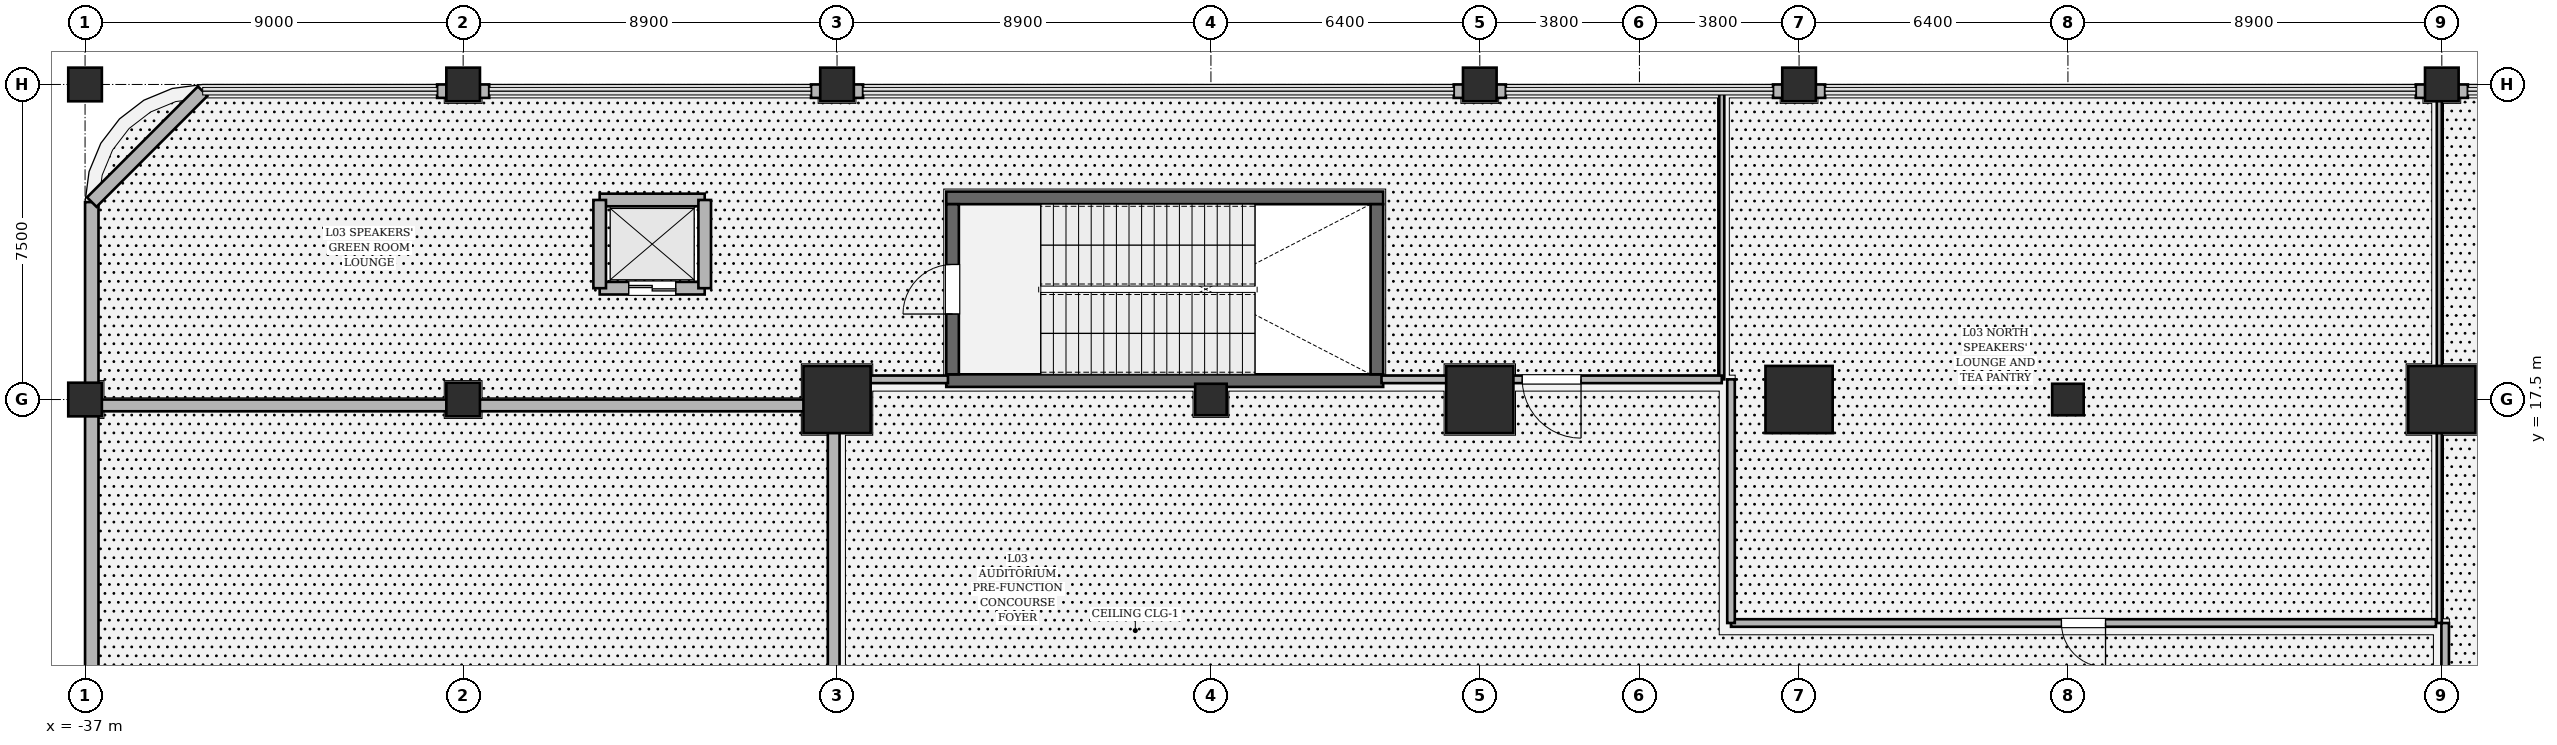
"""IFC4 building model, lengths in metres.
Left out: names, types, materials, properties, quantities, classifications, styles, units other than length and angle.
Written with IfcOpenShell. Run it as: python <this file> out.ifc"""

import sys

from ifc_helpers import new_model, si_unit, direction, frame, frame_2d, origin, origin_2d, place, context, subcontext, project, spatial, rectangle, hollow_rectangle, circle, extrude, element, fill, save


model = new_model("IFC4")
c1 = context("Model", 3, precision=1e-05, world=origin(), true_north=direction((0.0, 1.0)))
c2 = subcontext(c1, "Body", "Model", "MODEL_VIEW")
j1 = project(units=[si_unit("LENGTHUNIT", "METRE"), si_unit("PLANEANGLEUNIT", "RADIAN")], contexts=[c1])
p1 = place(None, origin())
s1 = spatial("IfcSite", under=j1, at=p1, CompositionType="ELEMENT")
p2 = place(p1, origin())
s2 = spatial("IfcBuilding", under=s1, at=p2, CompositionType="ELEMENT")
p3 = place(p2, frame((0.0, 0.0, 16.8)))
s3 = spatial("IfcBuildingStorey", under=s2, at=p3, CompositionType="ELEMENT", Elevation=16.8)
for number, where, z_axis, x_axis in (
    (1, (-16.5, 17.95, 0.0), (0.0, 0.0, 1.0), (1.0, 0.0, 0.0)),
    (2, (-6.1, 22.3, 0.0), (0.0, 0.0, 1.0), (-1.0, 0.0, 0.0)),
):
    element("IfcWall", number, at=place(p3, frame(where, z_axis=z_axis, x_axis=x_axis)), inside=s3, PredefinedType="SOLIDWALL", context=c2, shape_type="SweptSolid", body=[
        extrude(rectangle(XDim=10.4, YDim=0.3, at=frame_2d((5.2, 0.0))), origin(), (0.0, 0.0, 1.0), 5.4),
    ])
p4 = place(p3, frame((-16.35, 18.1, 0.0), z_axis=(0.0, 0.0, 1.0), x_axis=(0.0, 1.0, 0.0)))
e3 = element("IfcWall", 3, at=p4, inside=s3, PredefinedType="SOLIDWALL", context=c2, shape_type="SweptSolid", body=[
    extrude(rectangle(XDim=4.05, YDim=0.3, at=frame_2d((2.025, 0.0))), origin(), (0.0, 0.0, 1.0), 5.4),
])
p5 = place(p4, frame((1.435, 0.0, 0.0)))
e4 = element("IfcOpeningElement", 4, at=p5, cuts=e3, PredefinedType="OPENING", context=c2, shape_type="SweptSolid", body=[
    extrude(rectangle(XDim=1.18, YDim=2.2, at=frame_2d((0.59, 1.1))), frame((0.0, 0.16, 0.0), z_axis=(0.0, -1.0, 0.0), x_axis=(1.0, 0.0, 0.0)), (0.0, 0.0, 1.0), 0.32),
])
p6 = place(p3, frame((-6.25, 22.15, 0.0), z_axis=(0.0, 0.0, 1.0), x_axis=(0.0, -1.0, 0.0)))
e5 = element("IfcWall", 5, at=p6, inside=s3, PredefinedType="SOLIDWALL", context=c2, shape_type="SweptSolid", body=[
    extrude(rectangle(XDim=4.05, YDim=0.3, at=frame_2d((2.025, 0.0))), origin(), (0.0, 0.0, 1.0), 5.4),
])
for number, where, z_axis, x_axis in (
    (6, (19.1, 17.5, 0.0), (0.0, 0.0, 1.0), (1.0, 0.0, 0.0)),
    (7, (3.8, 17.5, 0.0), (0.0, 0.0, 1.0), (1.0, 0.0, 0.0)),
    (8, (-3.8, 17.5, 0.0), (0.0, 0.0, 1.0), (1.0, 0.0, 0.0)),
    (9, (-19.1, 17.5, 0.0), (0.0, 0.0, 1.0), (1.0, 0.0, 0.0)),
):
    element("IfcColumn", number, at=place(p3, frame(where, z_axis=z_axis, x_axis=x_axis)), inside=s3, PredefinedType="COLUMN", context=c2, shape_type="SweptSolid", body=[
        extrude(hollow_rectangle(XDim=1.6, YDim=1.6, WallThickness=0.05, at=origin_2d()), origin(), (0.0, 0.0, 1.0), 5.4),
    ])
for number, where, z_axis, x_axis in (
    (10, (-37.0, 17.5, 0.0), (0.0, 0.0, 1.0), (1.0, 0.0, 0.0)),
    (11, (-28.0, 17.5, 0.0), (0.0, 0.0, 1.0), (1.0, 0.0, 0.0)),
    (12, (-37.0, 25.0, 0.0), (0.0, 0.0, 1.0), (1.0, 0.0, 0.0)),
    (13, (-28.0, 25.0, 0.0), (0.0, 0.0, 1.0), (1.0, 0.0, 0.0)),
    (14, (-19.1, 25.0, 0.0), (0.0, 0.0, 1.0), (1.0, 0.0, 0.0)),
    (15, (-3.8, 25.0, 0.0), (0.0, 0.0, 1.0), (1.0, 0.0, 0.0)),
    (16, (3.8, 25.0, 0.0), (0.0, 0.0, 1.0), (1.0, 0.0, 0.0)),
    (17, (19.1, 25.0, 0.0), (0.0, 0.0, 1.0), (1.0, 0.0, 0.0)),
):
    element("IfcColumn", number, at=place(p3, frame(where, z_axis=z_axis, x_axis=x_axis)), inside=s3, PredefinedType="COLUMN", context=c2, shape_type="SweptSolid", body=[
        extrude(rectangle(XDim=0.8, YDim=0.8, at=origin_2d()), origin(), (0.0, 0.0, 1.0), 5.4),
    ])
for number, where, z_axis, x_axis in (
    (18, (-10.2, 17.5, 0.0), (0.0, 0.0, 1.0), (1.0, 0.0, 0.0)),
    (19, (10.2, 17.5, 0.0), (0.0, 0.0, 1.0), (1.0, 0.0, 0.0)),
):
    element("IfcColumn", number, at=place(p3, frame(where, z_axis=z_axis, x_axis=x_axis)), inside=s3, PredefinedType="PILASTER", context=c2, shape_type="SweptSolid", body=[
        extrude(circle(Radius=0.375, at=origin_2d()), origin(), (0.0, 0.0, 1.0), 5.4),
    ])
p7 = place(p3, frame((-27.38, 24.84, 0.0), z_axis=(0.0, 0.0, 1.0), x_axis=(-1.0, 0.0, 0.0)))
e20 = element("IfcWall", 20, at=p7, inside=s3, PredefinedType="SOLIDWALL", context=c2, shape_type="SweptSolid", body=[
    extrude(rectangle(XDim=1.24, YDim=0.32, at=frame_2d((0.62, 0.0))), origin(), (0.0, 0.0, 1.0), 4.314),
])
for number, where, z_axis, x_axis in (
    (21, (-18.48, 24.84, 0.0), (0.0, 0.0, 1.0), (-1.0, 0.0, 0.0)),
    (22, (-3.18, 24.84, 0.0), (0.0, 0.0, 1.0), (-1.0, 0.0, 0.0)),
    (23, (4.42, 24.84, 0.0), (0.0, 0.0, 1.0), (-1.0, 0.0, 0.0)),
    (24, (19.72, 24.84, 0.0), (0.0, 0.0, 1.0), (-1.0, 0.0, 0.0)),
):
    element("IfcWall", number, at=place(p3, frame(where, z_axis=z_axis, x_axis=x_axis)), inside=s3, PredefinedType="SOLIDWALL", context=c2, shape_type="SweptSolid", body=[
        extrude(rectangle(XDim=1.24, YDim=0.32, at=frame_2d((0.62, 0.0))), origin(), (0.0, 0.0, 1.0), 4.314),
    ])
p8 = place(p3, frame((-36.84, -22.2, 0.0), z_axis=(0.0, 0.0, 1.0), x_axis=(0.0, 1.0, 0.0)))
e25 = element("IfcWall", 25, at=p8, inside=s3, PredefinedType="SOLIDWALL", context=c2, shape_type="SweptSolid", body=[
    extrude(rectangle(XDim=44.4, YDim=0.32, at=frame_2d((22.2, 0.0))), origin(), (0.0, 0.0, 1.0), 3.164),
])
p9 = place(p3, frame((-36.84, 22.2, 0.0), z_axis=(0.0, 0.0, 1.0), x_axis=(0.707106781187, 0.707106781187, 0.0)))
e26 = element("IfcWall", 26, at=p9, inside=s3, PredefinedType="SOLIDWALL", context=c2, shape_type="SweptSolid", body=[
    extrude(rectangle(XDim=3.734, YDim=0.32, at=frame_2d((1.867, 0.0))), origin(), (0.0, 0.0, 1.0), 4.464),
])
p10 = place(p3, frame((-24.75, 20.15, 0.0), z_axis=(0.0, 0.0, 1.0), x_axis=(1.0, 0.0, 0.0)))
e27 = element("IfcWall", 27, at=p10, inside=s3, PredefinedType="SOLIDWALL", context=c2, shape_type="SweptSolid", body=[
    extrude(rectangle(XDim=2.5, YDim=0.3, at=frame_2d((1.25, 0.0))), origin(), (0.0, 0.0, 1.0), 5.02),
])
p11 = place(p10, frame((0.69, 0.0, 0.0)))
e28 = element("IfcOpeningElement", 28, at=p11, cuts=e27, PredefinedType="OPENING", context=c2, shape_type="SweptSolid", body=[
    extrude(rectangle(XDim=1.12, YDim=2.25, at=frame_2d((0.56, 1.125))), frame((0.0, 0.16, 0.0), z_axis=(0.0, -1.0, 0.0), x_axis=(1.0, 0.0, 0.0)), (0.0, 0.0, 1.0), 0.32),
])
p12 = place(p3, frame((-24.75, 22.25, 0.0), z_axis=(0.0, 0.0, 1.0), x_axis=(1.0, 0.0, 0.0)))
e29 = element("IfcWall", 29, at=p12, inside=s3, PredefinedType="SOLIDWALL", context=c2, shape_type="SweptSolid", body=[
    extrude(rectangle(XDim=2.5, YDim=0.3, at=frame_2d((1.25, 0.0))), origin(), (0.0, 0.0, 1.0), 5.02),
])
for number, where, z_axis, x_axis in (
    (30, (-24.75, 20.15, 0.0), (0.0, 0.0, 1.0), (0.0, 1.0, 0.0)),
    (31, (-22.25, 20.15, 0.0), (0.0, 0.0, 1.0), (0.0, 1.0, 0.0)),
):
    element("IfcWall", number, at=place(p3, frame(where, z_axis=z_axis, x_axis=x_axis)), inside=s3, PredefinedType="SOLIDWALL", context=c2, shape_type="SweptSolid", body=[
        extrude(rectangle(XDim=2.1, YDim=0.3, at=frame_2d((1.05, 0.0))), origin(), (0.0, 0.0, 1.0), 5.02),
    ])
p13 = place(p3, frame((-36.78, 17.36, 0.0), z_axis=(0.0, 0.0, 1.0), x_axis=(1.0, 0.0, 0.0)))
e32 = element("IfcWall", 32, at=p13, inside=s3, PredefinedType="SOLIDWALL", context=c2, shape_type="SweptSolid", body=[
    extrude(rectangle(XDim=17.6, YDim=0.28, at=frame_2d((8.8, 0.0))), origin(), (0.0, 0.0, 1.0), 3.164),
])
p14 = place(p3, frame((-19.18, 17.36, 0.0), z_axis=(0.0, 0.0, 1.0), x_axis=(0.0, -1.0, 0.0)))
e33 = element("IfcWall", 33, at=p14, inside=s3, PredefinedType="SOLIDWALL", context=c2, shape_type="SweptSolid", body=[
    extrude(rectangle(XDim=29.54, YDim=0.28, at=frame_2d((14.77, 0.0))), origin(), (0.0, 0.0, 1.0), 3.164),
])
p15 = place(p14, frame((15.22, 0.0, 0.0)))
e34 = element("IfcOpeningElement", 34, at=p15, cuts=e33, PredefinedType="OPENING", context=c2, shape_type="SweptSolid", body=[
    extrude(rectangle(XDim=1.8, YDim=2.35, at=frame_2d((0.9, 1.175))), frame((0.0, 0.15, 0.0), z_axis=(0.0, -1.0, 0.0), x_axis=(1.0, 0.0, 0.0)), (0.0, 0.0, 1.0), 0.3),
])
p16 = place(p3, frame((1.96, 24.78, 0.0), z_axis=(0.0, 0.0, 1.0), x_axis=(0.0, -1.0, 0.0)))
e35 = element("IfcWall", 35, at=p16, inside=s3, PredefinedType="PARTITIONING", context=c2, shape_type="SweptSolid", body=[
    extrude(rectangle(XDim=6.8, YDim=0.12, at=frame_2d((3.4, 0.0))), origin(), (0.0, 0.0, 1.0), 5.02),
])
p17 = place(p3, frame((1.96, 17.98, 0.0), z_axis=(0.0, 0.0, 1.0), x_axis=(-1.0, 0.0, 0.0)))
e36 = element("IfcWall", 36, at=p17, inside=s3, PredefinedType="PARTITIONING", context=c2, shape_type="SweptSolid", body=[
    extrude(rectangle(XDim=8.1, YDim=0.18, at=frame_2d((4.05, 0.0))), origin(), (0.0, 0.0, 1.0), 4.314),
])
p18 = place(p17, frame((3.35, 0.0, 0.0)))
e37 = element("IfcOpeningElement", 37, at=p18, cuts=e36, PredefinedType="OPENING", context=c2, shape_type="SweptSolid", body=[
    extrude(rectangle(XDim=1.4, YDim=2.25, at=frame_2d((0.7, 1.125))), frame((0.0, 0.1, 0.0), z_axis=(0.0, -1.0, 0.0), x_axis=(1.0, 0.0, 0.0)), (0.0, 0.0, 1.0), 0.2),
])
p19 = place(p3, frame((-16.46, 17.98, 0.0), z_axis=(0.0, 0.0, 1.0), x_axis=(-1.0, 0.0, 0.0)))
e38 = element("IfcWall", 38, at=p19, inside=s3, PredefinedType="PARTITIONING", context=c2, shape_type="SweptSolid", body=[
    extrude(rectangle(XDim=2.72, YDim=0.18, at=frame_2d((1.36, 0.0))), origin(), (0.0, 0.0, 1.0), 4.314),
])
p20 = place(p3, frame((19.18, 6.18, 0.0), z_axis=(0.0, 0.0, 1.0), x_axis=(0.0, 1.0, 0.0)))
e39 = element("IfcWall", 39, at=p20, inside=s3, PredefinedType="PARTITIONING", context=c2, shape_type="SweptSolid", body=[
    extrude(rectangle(XDim=6.0, YDim=0.18, at=frame_2d((3.0, 0.0))), origin(), (0.0, 0.0, 1.0), 4.314),
])
p21 = place(p3, frame((19.04, 12.18, 0.0), z_axis=(0.0, 0.0, 1.0), x_axis=(0.0, 1.0, 0.0)))
e40 = element("IfcWall", 40, at=p21, inside=s3, PredefinedType="PARTITIONING", context=c2, shape_type="SweptSolid", body=[
    extrude(rectangle(XDim=12.6, YDim=0.12, at=frame_2d((6.3, 0.0))), origin(), (0.0, 0.0, 1.0), 4.314),
])
p22 = place(p3, frame((18.96, 12.18, 0.0), z_axis=(0.0, 0.0, 1.0), x_axis=(-1.0, 0.0, 0.0)))
e41 = element("IfcWall", 41, at=p22, inside=s3, PredefinedType="PARTITIONING", context=c2, shape_type="SweptSolid", body=[
    extrude(rectangle(XDim=16.78, YDim=0.18, at=frame_2d((8.39, 0.0))), origin(), (0.0, 0.0, 1.0), 4.314),
])
p23 = place(p22, frame((7.865, 0.0, 0.0)))
e42 = element("IfcOpeningElement", 42, at=p23, cuts=e41, PredefinedType="OPENING", context=c2, shape_type="SweptSolid", body=[
    extrude(rectangle(XDim=1.05, YDim=2.2, at=frame_2d((0.525, 1.1))), frame((0.0, 0.1, 0.0), z_axis=(0.0, -1.0, 0.0), x_axis=(1.0, 0.0, 0.0)), (0.0, 0.0, 1.0), 0.2),
])
p24 = place(p3, frame((2.18, 12.18, 0.0), z_axis=(0.0, 0.0, 1.0), x_axis=(0.0, 1.0, 0.0)))
e43 = element("IfcWall", 43, at=p24, inside=s3, PredefinedType="PARTITIONING", context=c2, shape_type="SweptSolid", body=[
    extrude(rectangle(XDim=5.8, YDim=0.18, at=frame_2d((2.9, 0.0))), origin(), (0.0, 0.0, 1.0), 4.314),
])
p25 = place(p5, origin())
e44 = element("IfcDoor", 44, at=p25, inside=s3, OperationType="SINGLE_SWING_LEFT", PredefinedType="DOOR", context=c2, shape_type="SweptSolid", body=[
    extrude(rectangle(XDim=1.18, YDim=2.2, at=frame_2d((0.59, 1.1))), frame((0.0, 0.025, 0.0), z_axis=(0.0, -1.0, 0.0), x_axis=(1.0, 0.0, 0.0)), (0.0, 0.0, 1.0), 0.05),
])
fill(e4, e44)
p26 = place(p11, origin())
e45 = element("IfcDoor", 45, at=p26, inside=s3, OperationType="DOUBLE_DOOR_SLIDING", PredefinedType="DOOR", context=c2, shape_type="SweptSolid", body=[
    extrude(rectangle(XDim=1.12, YDim=2.25, at=frame_2d((0.56, 1.125))), frame((0.0, 0.025, 0.0), z_axis=(0.0, -1.0, 0.0), x_axis=(1.0, 0.0, 0.0)), (0.0, 0.0, 1.0), 0.05),
])
fill(e28, e45)
p27 = place(p18, origin())
e46 = element("IfcDoor", 46, at=p27, inside=s3, OperationType="SINGLE_SWING_LEFT", PredefinedType="DOOR", context=c2, shape_type="SweptSolid", body=[
    extrude(rectangle(XDim=1.4, YDim=2.25, at=frame_2d((0.7, 1.125))), frame((0.0, 0.025, 0.0), z_axis=(0.0, -1.0, 0.0), x_axis=(1.0, 0.0, 0.0)), (0.0, 0.0, 1.0), 0.05),
])
fill(e37, e46)
p28 = place(p23, origin())
e47 = element("IfcDoor", 47, at=p28, inside=s3, OperationType="SINGLE_SWING_LEFT", PredefinedType="DOOR", context=c2, shape_type="SweptSolid", body=[
    extrude(rectangle(XDim=1.05, YDim=2.2, at=frame_2d((0.525, 1.1))), frame((0.0, 0.025, 0.0), z_axis=(0.0, -1.0, 0.0), x_axis=(1.0, 0.0, 0.0)), (0.0, 0.0, 1.0), 0.05),
])
fill(e42, e47)
save(model, sys.argv[1])
